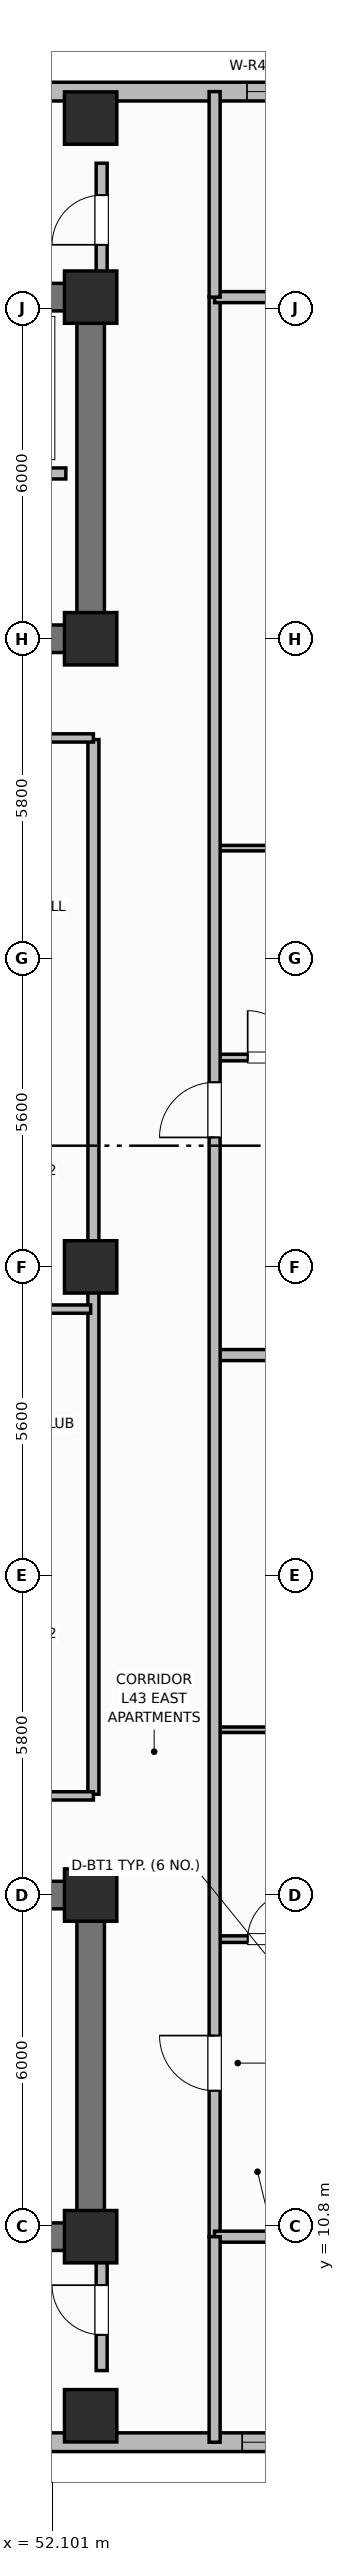
"""IFC4 building model, lengths in metres.
Left out: names, types, materials, properties, quantities, classifications, styles, units other than length and angle.
Written with IfcOpenShell. Run it as: python <this file> out.ifc"""

import sys

from ifc_helpers import new_model, si_unit, direction, frame, frame_2d, origin, origin_2d, place, context, subcontext, project, spatial, rectangle, extrude, element, fill, save


model = new_model("IFC4")
c1 = context("Model", 3, precision=1e-05, world=origin(), true_north=direction((0.0, 1.0)))
c2 = subcontext(c1, "Body", "Model", "MODEL_VIEW")
j1 = project(units=[si_unit("LENGTHUNIT", "METRE"), si_unit("PLANEANGLEUNIT", "RADIAN")], contexts=[c1])
p1 = place(None, origin())
s1 = spatial("IfcSite", under=j1, at=p1, CompositionType="ELEMENT")
p2 = place(p1, origin())
s2 = spatial("IfcBuilding", under=s1, at=p2, CompositionType="ELEMENT")
p3 = place(p2, frame((0.0, 0.0, 173.7)))
s3 = spatial("IfcBuildingStorey", under=s2, at=p3, CompositionType="ELEMENT", Elevation=173.7)
p4 = place(p3, frame((52.8, 10.6, 0.0), z_axis=(0.0, 0.0, 1.0), x_axis=(-1.0, 0.0, 0.0)))
e1 = element("IfcWall", 1, at=p4, inside=s3, PredefinedType="SHEAR", context=c2, shape_type="SweptSolid", body=[
    extrude(rectangle(XDim=27.2, YDim=0.5, at=frame_2d((13.6, 0.0))), origin(), (0.0, 0.0, 1.0), 3.7),
])
p5 = place(p3, frame((52.8, 10.85, 0.0), z_axis=(0.0, 0.0, 1.0), x_axis=(0.0, 1.0, 0.0)))
e2 = element("IfcWall", 2, at=p5, inside=s3, PredefinedType="SHEAR", context=c2, shape_type="SweptSolid", body=[
    extrude(rectangle(XDim=5.7, YDim=0.5, at=frame_2d((2.85, 0.0))), origin(), (0.0, 0.0, 1.0), 3.7),
])
p6 = place(p3, frame((25.6, 16.8, 0.0), z_axis=(0.0, 0.0, 1.0), x_axis=(1.0, 0.0, 0.0)))
e3 = element("IfcWall", 3, at=p6, inside=s3, PredefinedType="SHEAR", context=c2, shape_type="SweptSolid", body=[
    extrude(rectangle(XDim=27.2, YDim=0.5, at=frame_2d((13.6, 0.0))), origin(), (0.0, 0.0, 1.0), 3.7),
])
p7 = place(p6, frame((1.8, 0.0, 0.0)))
e4 = element("IfcOpeningElement", 4, at=p7, cuts=e3, PredefinedType="OPENING", context=c2, shape_type="SweptSolid", body=[
    extrude(rectangle(XDim=1.1, YDim=2.15, at=frame_2d((0.55, 1.075))), frame((0.0, 0.26, 0.0), z_axis=(0.0, -1.0, 0.0), x_axis=(1.0, 0.0, 0.0)), (0.0, 0.0, 1.0), 0.52),
])
p8 = place(p6, frame((5.6, 0.0, 0.0)))
e5 = element("IfcOpeningElement", 5, at=p8, cuts=e3, PredefinedType="OPENING", context=c2, shape_type="SweptSolid", body=[
    extrude(rectangle(XDim=0.85, YDim=2.1, at=frame_2d((0.425, 1.05))), frame((0.0, 0.26, 0.0), z_axis=(0.0, -1.0, 0.0), x_axis=(1.0, 0.0, 0.0)), (0.0, 0.0, 1.0), 0.52),
])
p9 = place(p6, frame((13.0, 0.0, 0.0)))
e6 = element("IfcOpeningElement", 6, at=p9, cuts=e3, PredefinedType="OPENING", context=c2, shape_type="SweptSolid", body=[
    extrude(rectangle(XDim=1.2, YDim=2.15, at=frame_2d((0.6, 1.075))), frame((0.0, 0.26, 0.0), z_axis=(0.0, -1.0, 0.0), x_axis=(1.0, 0.0, 0.0)), (0.0, 0.0, 1.0), 0.52),
])
p10 = place(p6, frame((19.2, 0.0, 0.0)))
e7 = element("IfcOpeningElement", 7, at=p10, cuts=e3, PredefinedType="OPENING", context=c2, shape_type="SweptSolid", body=[
    extrude(rectangle(XDim=0.85, YDim=2.1, at=frame_2d((0.425, 1.05))), frame((0.0, 0.26, 0.0), z_axis=(0.0, -1.0, 0.0), x_axis=(1.0, 0.0, 0.0)), (0.0, 0.0, 1.0), 0.52),
])
p11 = place(p6, frame((23.8, 0.0, 0.0)))
e8 = element("IfcOpeningElement", 8, at=p11, cuts=e3, PredefinedType="OPENING", context=c2, shape_type="SweptSolid", body=[
    extrude(rectangle(XDim=0.9, YDim=2.1, at=frame_2d((0.45, 1.05))), frame((0.0, 0.26, 0.0), z_axis=(0.0, -1.0, 0.0), x_axis=(1.0, 0.0, 0.0)), (0.0, 0.0, 1.0), 0.52),
])
p12 = place(p3, frame((25.6, 45.8, 0.0), z_axis=(0.0, 0.0, 1.0), x_axis=(1.0, 0.0, 0.0)))
e9 = element("IfcWall", 9, at=p12, inside=s3, PredefinedType="SHEAR", context=c2, shape_type="SweptSolid", body=[
    extrude(rectangle(XDim=27.2, YDim=0.5, at=frame_2d((13.6, 0.0))), origin(), (0.0, 0.0, 1.0), 3.7),
])
p13 = place(p3, frame((52.8, 39.85, 0.0), z_axis=(0.0, 0.0, 1.0), x_axis=(0.0, 1.0, 0.0)))
e10 = element("IfcWall", 10, at=p13, inside=s3, PredefinedType="SHEAR", context=c2, shape_type="SweptSolid", body=[
    extrude(rectangle(XDim=5.7, YDim=0.5, at=frame_2d((2.85, 0.0))), origin(), (0.0, 0.0, 1.0), 3.7),
])
p14 = place(p3, frame((52.8, 39.6, 0.0), z_axis=(0.0, 0.0, 1.0), x_axis=(-1.0, 0.0, 0.0)))
e11 = element("IfcWall", 11, at=p14, inside=s3, PredefinedType="SHEAR", context=c2, shape_type="SweptSolid", body=[
    extrude(rectangle(XDim=27.2, YDim=0.5, at=frame_2d((13.6, 0.0))), origin(), (0.0, 0.0, 1.0), 3.7),
])
p15 = place(p14, frame((24.2, 0.0, 0.0)))
e12 = element("IfcOpeningElement", 12, at=p15, cuts=e11, PredefinedType="OPENING", context=c2, shape_type="SweptSolid", body=[
    extrude(rectangle(XDim=1.1, YDim=2.15, at=frame_2d((0.55, 1.075))), frame((0.0, 0.26, 0.0), z_axis=(0.0, -1.0, 0.0), x_axis=(1.0, 0.0, 0.0)), (0.0, 0.0, 1.0), 0.52),
])
p16 = place(p14, frame((20.55, 0.0, 0.0)))
e13 = element("IfcOpeningElement", 13, at=p16, cuts=e11, PredefinedType="OPENING", context=c2, shape_type="SweptSolid", body=[
    extrude(rectangle(XDim=0.95, YDim=2.1, at=frame_2d((0.475, 1.05))), frame((0.0, 0.26, 0.0), z_axis=(0.0, -1.0, 0.0), x_axis=(1.0, 0.0, 0.0)), (0.0, 0.0, 1.0), 0.52),
])
p17 = place(p14, frame((15.1, 0.0, 0.0)))
e14 = element("IfcOpeningElement", 14, at=p17, cuts=e11, PredefinedType="OPENING", context=c2, shape_type="SweptSolid", body=[
    extrude(rectangle(XDim=1.2, YDim=2.15, at=frame_2d((0.6, 1.075))), frame((0.0, 0.26, 0.0), z_axis=(0.0, -1.0, 0.0), x_axis=(1.0, 0.0, 0.0)), (0.0, 0.0, 1.0), 0.52),
])
p18 = place(p14, frame((13.05, 0.0, 0.0)))
e15 = element("IfcOpeningElement", 15, at=p18, cuts=e11, PredefinedType="OPENING", context=c2, shape_type="SweptSolid", body=[
    extrude(rectangle(XDim=0.85, YDim=2.1, at=frame_2d((0.425, 1.05))), frame((0.0, 0.26, 0.0), z_axis=(0.0, -1.0, 0.0), x_axis=(1.0, 0.0, 0.0)), (0.0, 0.0, 1.0), 0.52),
])
p19 = place(p14, frame((11.0, 0.0, 0.0)))
e16 = element("IfcOpeningElement", 16, at=p19, cuts=e11, PredefinedType="OPENING", context=c2, shape_type="SweptSolid", body=[
    extrude(rectangle(XDim=0.85, YDim=2.1, at=frame_2d((0.425, 1.05))), frame((0.0, 0.26, 0.0), z_axis=(0.0, -1.0, 0.0), x_axis=(1.0, 0.0, 0.0)), (0.0, 0.0, 1.0), 0.52),
])
p20 = place(p14, frame((7.35, 0.0, 0.0)))
e17 = element("IfcOpeningElement", 17, at=p20, cuts=e11, PredefinedType="OPENING", context=c2, shape_type="SweptSolid", body=[
    extrude(rectangle(XDim=0.85, YDim=2.1, at=frame_2d((0.425, 1.05))), frame((0.0, 0.26, 0.0), z_axis=(0.0, -1.0, 0.0), x_axis=(1.0, 0.0, 0.0)), (0.0, 0.0, 1.0), 0.52),
])
p21 = place(p14, frame((4.8, 0.0, 0.0)))
e18 = element("IfcOpeningElement", 18, at=p21, cuts=e11, PredefinedType="OPENING", context=c2, shape_type="SweptSolid", body=[
    extrude(rectangle(XDim=0.85, YDim=2.1, at=frame_2d((0.425, 1.05))), frame((0.0, 0.26, 0.0), z_axis=(0.0, -1.0, 0.0), x_axis=(1.0, 0.0, 0.0)), (0.0, 0.0, 1.0), 0.52),
])
p22 = place(p14, frame((1.9, 0.0, 0.0)))
e19 = element("IfcOpeningElement", 19, at=p22, cuts=e11, PredefinedType="OPENING", context=c2, shape_type="SweptSolid", body=[
    extrude(rectangle(XDim=0.85, YDim=2.1, at=frame_2d((0.425, 1.05))), frame((0.0, 0.26, 0.0), z_axis=(0.0, -1.0, 0.0), x_axis=(1.0, 0.0, 0.0)), (0.0, 0.0, 1.0), 0.52),
])
for number, where, z_axis, x_axis in (
    (20, (52.8, 10.6, 0.0), (0.0, 0.0, 1.0), (1.0, 0.0, 0.0)),
    (21, (52.8, 16.8, 0.0), (0.0, 0.0, 1.0), (1.0, 0.0, 0.0)),
    (22, (52.8, 39.6, 0.0), (0.0, 0.0, 1.0), (1.0, 0.0, 0.0)),
    (23, (52.8, 45.8, 0.0), (0.0, 0.0, 1.0), (1.0, 0.0, 0.0)),
    (24, (52.8, 28.2, 0.0), (0.0, 0.0, 1.0), (1.0, 0.0, 0.0)),
    (25, (52.8, 7.35, 0.0), (0.0, 0.0, 1.0), (1.0, 0.0, 0.0)),
    (26, (52.8, 49.05, 0.0), (0.0, 0.0, 1.0), (1.0, 0.0, 0.0)),
):
    element("IfcColumn", number, at=place(p3, frame(where, z_axis=z_axis, x_axis=x_axis)), inside=s3, PredefinedType="COLUMN", context=c2, shape_type="SweptSolid", body=[
        extrude(rectangle(XDim=0.95, YDim=0.95, at=origin_2d()), origin(), (0.0, 0.0, 1.0), 3.7),
    ])
p23 = place(p3, frame((42.4, 6.87, 0.0), z_axis=(0.0, 0.0, 1.0), x_axis=(1.0, 0.0, 0.0)))
e27 = element("IfcWall", 27, at=p23, inside=s3, PredefinedType="SOLIDWALL", context=c2, shape_type="SweptSolid", body=[
    extrude(rectangle(XDim=15.8, YDim=0.34, at=frame_2d((7.9, 0.0))), origin(), (0.0, 0.0, 1.0), 2.72),
])
p24 = place(p23, frame((4.45, 0.0, 0.95)))
e28 = element("IfcOpeningElement", 28, at=p24, cuts=e27, PredefinedType="OPENING", context=c2, shape_type="SweptSolid", body=[
    extrude(rectangle(XDim=1.1, YDim=1.65, at=frame_2d((0.55, 0.825))), frame((0.0, 0.18, 0.0), z_axis=(0.0, -1.0, 0.0), x_axis=(1.0, 0.0, 0.0)), (0.0, 0.0, 1.0), 0.36),
])
p25 = place(p23, frame((7.35, 0.0, 0.95)))
e29 = element("IfcOpeningElement", 29, at=p25, cuts=e27, PredefinedType="OPENING", context=c2, shape_type="SweptSolid", body=[
    extrude(rectangle(XDim=1.1, YDim=1.65, at=frame_2d((0.55, 0.825))), frame((0.0, 0.18, 0.0), z_axis=(0.0, -1.0, 0.0), x_axis=(1.0, 0.0, 0.0)), (0.0, 0.0, 1.0), 0.36),
])
p26 = place(p23, frame((13.15, 0.0, 0.95)))
e30 = element("IfcOpeningElement", 30, at=p26, cuts=e27, PredefinedType="OPENING", context=c2, shape_type="SweptSolid", body=[
    extrude(rectangle(XDim=1.1, YDim=1.65, at=frame_2d((0.55, 0.825))), frame((0.0, 0.18, 0.0), z_axis=(0.0, -1.0, 0.0), x_axis=(1.0, 0.0, 0.0)), (0.0, 0.0, 1.0), 0.36),
])
p27 = place(p3, frame((58.2, 49.53, 0.0), z_axis=(0.0, 0.0, 1.0), x_axis=(-1.0, 0.0, 0.0)))
e31 = element("IfcWall", 31, at=p27, inside=s3, PredefinedType="SOLIDWALL", context=c2, shape_type="SweptSolid", body=[
    extrude(rectangle(XDim=15.8, YDim=0.34, at=frame_2d((7.9, 0.0))), origin(), (0.0, 0.0, 1.0), 2.72),
])
p28 = place(p27, frame((0.962, 0.0, 0.7)))
e32 = element("IfcOpeningElement", 32, at=p28, cuts=e31, PredefinedType="OPENING", context=c2, shape_type="SweptSolid", body=[
    extrude(rectangle(XDim=1.6, YDim=1.9, at=frame_2d((0.8, 0.95))), frame((0.0, 0.18, 0.0), z_axis=(0.0, -1.0, 0.0), x_axis=(1.0, 0.0, 0.0)), (0.0, 0.0, 1.0), 0.36),
])
p29 = place(p27, frame((8.913, 0.0, 0.7)))
e33 = element("IfcOpeningElement", 33, at=p29, cuts=e31, PredefinedType="OPENING", context=c2, shape_type="SweptSolid", body=[
    extrude(rectangle(XDim=1.6, YDim=1.9, at=frame_2d((0.8, 0.95))), frame((0.0, 0.18, 0.0), z_axis=(0.0, -1.0, 0.0), x_axis=(1.0, 0.0, 0.0)), (0.0, 0.0, 1.0), 0.36),
])
p30 = place(p3, frame((52.35, 42.6, 0.0), z_axis=(0.0, 0.0, 1.0), x_axis=(-1.0, 0.0, 0.0)))
e34 = element("IfcWall", 34, at=p30, inside=s3, PredefinedType="PARTITIONING", context=c2, shape_type="SweptSolid", body=[
    extrude(rectangle(XDim=6.5, YDim=0.2, at=frame_2d((3.25, 0.0))), origin(), (0.0, 0.0, 1.0), 2.55),
])
p31 = place(p3, frame((52.85, 18.63, 0.0), z_axis=(0.0, 0.0, 1.0), x_axis=(0.0, 1.0, 0.0)))
e35 = element("IfcWall", 35, at=p31, inside=s3, PredefinedType="PARTITIONING", context=c2, shape_type="SweptSolid", body=[
    extrude(rectangle(XDim=19.14, YDim=0.2, at=frame_2d((9.57, 0.0))), origin(), (0.0, 0.0, 1.0), 2.55),
])
for number, where, z_axis, x_axis in (
    (36, (50.05, 18.6, 0.0), (0.0, 0.0, 1.0), (1.0, 0.0, 0.0)),
    (37, (50.05, 37.8, 0.0), (0.0, 0.0, 1.0), (1.0, 0.0, 0.0)),
):
    element("IfcWall", number, at=place(p3, frame(where, z_axis=z_axis, x_axis=x_axis)), inside=s3, PredefinedType="PARTITIONING", context=c2, shape_type="SweptSolid", body=[
        extrude(rectangle(XDim=2.8, YDim=0.15, at=frame_2d((1.4, 0.0))), origin(), (0.0, 0.0, 1.0), 2.55),
    ])
p32 = place(p3, frame((50.08, 27.434, 0.0), z_axis=(0.0, 0.0, 1.0), x_axis=(1.0, 0.0, 0.0)))
e38 = element("IfcWall", 38, at=p32, inside=s3, PredefinedType="PARTITIONING", context=c2, shape_type="SweptSolid", body=[
    extrude(rectangle(XDim=2.72, YDim=0.15, at=frame_2d((1.36, 0.0))), origin(), (0.0, 0.0, 1.0), 2.55),
])
p33 = place(p3, frame((55.05, 16.0, 0.0), z_axis=(0.0, 0.0, 1.0), x_axis=(1.0, 0.0, 0.0)))
e39 = element("IfcWall", 39, at=p33, inside=s3, PredefinedType="PARTITIONING", context=c2, shape_type="SweptSolid", body=[
    extrude(rectangle(XDim=2.25, YDim=0.12, at=frame_2d((1.125, 0.0))), origin(), (0.0, 0.0, 1.0), 2.55),
])
p34 = place(p33, frame((0.6, 0.0, 0.0)))
e40 = element("IfcOpeningElement", 40, at=p34, cuts=e39, PredefinedType="OPENING", context=c2, shape_type="SweptSolid", body=[
    extrude(rectangle(XDim=0.85, YDim=2.1, at=frame_2d((0.425, 1.05))), frame((0.0, 0.07, 0.0), z_axis=(0.0, -1.0, 0.0), x_axis=(1.0, 0.0, 0.0)), (0.0, 0.0, 1.0), 0.14),
])
p35 = place(p3, frame((55.05, 19.8, 0.0), z_axis=(0.0, 0.0, 1.0), x_axis=(1.0, 0.0, 0.0)))
e41 = element("IfcWall", 41, at=p35, inside=s3, PredefinedType="PARTITIONING", context=c2, shape_type="SweptSolid", body=[
    extrude(rectangle(XDim=2.25, YDim=0.1, at=frame_2d((1.125, 0.0))), origin(), (0.0, 0.0, 1.0), 2.55),
])
p36 = place(p3, frame((55.05, 26.6, 0.0), z_axis=(0.0, 0.0, 1.0), x_axis=(1.0, 0.0, 0.0)))
e42 = element("IfcWall", 42, at=p36, inside=s3, PredefinedType="PARTITIONING", context=c2, shape_type="SweptSolid", body=[
    extrude(rectangle(XDim=6.066, YDim=0.2, at=frame_2d((3.033, 0.0))), origin(), (0.0, 0.0, 1.0), 2.55),
])
p37 = place(p3, frame((55.05, 32.0, 0.0), z_axis=(0.0, 0.0, 1.0), x_axis=(1.0, 0.0, 0.0)))
e43 = element("IfcWall", 43, at=p37, inside=s3, PredefinedType="PARTITIONING", context=c2, shape_type="SweptSolid", body=[
    extrude(rectangle(XDim=2.25, YDim=0.12, at=frame_2d((1.125, 0.0))), origin(), (0.0, 0.0, 1.0), 2.55),
])
p38 = place(p37, frame((0.6, 0.0, 0.0)))
e44 = element("IfcOpeningElement", 44, at=p38, cuts=e43, PredefinedType="OPENING", context=c2, shape_type="SweptSolid", body=[
    extrude(rectangle(XDim=0.85, YDim=2.1, at=frame_2d((0.425, 1.05))), frame((0.0, 0.07, 0.0), z_axis=(0.0, -1.0, 0.0), x_axis=(1.0, 0.0, 0.0)), (0.0, 0.0, 1.0), 0.14),
])
p39 = place(p3, frame((55.05, 35.8, 0.0), z_axis=(0.0, 0.0, 1.0), x_axis=(1.0, 0.0, 0.0)))
e45 = element("IfcWall", 45, at=p39, inside=s3, PredefinedType="PARTITIONING", context=c2, shape_type="SweptSolid", body=[
    extrude(rectangle(XDim=2.25, YDim=0.1, at=frame_2d((1.125, 0.0))), origin(), (0.0, 0.0, 1.0), 2.55),
])
p40 = place(p3, frame((55.05, 10.6, 0.0), z_axis=(0.0, 0.0, 1.0), x_axis=(0.0, 1.0, 0.0)))
e46 = element("IfcWall", 46, at=p40, inside=s3, PredefinedType="PARTITIONING", context=c2, shape_type="SweptSolid", body=[
    extrude(rectangle(XDim=35.2, YDim=0.2, at=frame_2d((17.6, 0.0))), origin(), (0.0, 0.0, 1.0), 2.55),
])
p41 = place(p40, frame((2.65, 0.0, 0.0)))
e47 = element("IfcOpeningElement", 47, at=p41, cuts=e46, PredefinedType="OPENING", context=c2, shape_type="SweptSolid", body=[
    extrude(rectangle(XDim=1.0, YDim=2.15, at=frame_2d((0.5, 1.075))), frame((0.0, 0.11, 0.0), z_axis=(0.0, -1.0, 0.0), x_axis=(1.0, 0.0, 0.0)), (0.0, 0.0, 1.0), 0.22),
])
p42 = place(p40, frame((19.95, 0.0, 0.0)))
e48 = element("IfcOpeningElement", 48, at=p42, cuts=e46, PredefinedType="OPENING", context=c2, shape_type="SweptSolid", body=[
    extrude(rectangle(XDim=1.0, YDim=2.15, at=frame_2d((0.5, 1.075))), frame((0.0, 0.11, 0.0), z_axis=(0.0, -1.0, 0.0), x_axis=(1.0, 0.0, 0.0)), (0.0, 0.0, 1.0), 0.22),
])
for number, where, z_axis, x_axis in (
    (49, (55.05, 10.6, 0.0), (0.0, 0.0, 1.0), (1.0, 0.0, 0.0)),
    (50, (55.05, 45.8, 0.0), (0.0, 0.0, 1.0), (1.0, 0.0, 0.0)),
):
    element("IfcWall", number, at=place(p3, frame(where, z_axis=z_axis, x_axis=x_axis)), inside=s3, PredefinedType="PARTITIONING", context=c2, shape_type="SweptSolid", body=[
        extrude(rectangle(XDim=6.36, YDim=0.2, at=frame_2d((3.18, 0.0))), origin(), (0.0, 0.0, 1.0), 2.55),
    ])
for number, where, z_axis, x_axis in (
    (51, (55.05, 6.87, 0.0), (0.0, 0.0, 1.0), (0.0, 1.0, 0.0)),
    (52, (55.05, 45.8, 0.0), (0.0, 0.0, 1.0), (0.0, 1.0, 0.0)),
):
    element("IfcWall", number, at=place(p3, frame(where, z_axis=z_axis, x_axis=x_axis)), inside=s3, PredefinedType="PARTITIONING", context=c2, shape_type="SweptSolid", body=[
        extrude(rectangle(XDim=3.73, YDim=0.2, at=frame_2d((1.865, 0.0))), origin(), (0.0, 0.0, 1.0), 2.55),
    ])
p43 = place(p3, frame((53.0, 8.17, 0.0), z_axis=(0.0, 0.0, 1.0), x_axis=(0.0, 1.0, 0.0)))
e53 = element("IfcWall", 53, at=p43, inside=s3, PredefinedType="PARTITIONING", context=c2, shape_type="SweptSolid", body=[
    extrude(rectangle(XDim=2.13, YDim=0.2, at=frame_2d((1.065, 0.0))), origin(), (0.0, 0.0, 1.0), 2.55),
])
p44 = place(p43, frame((0.65, 0.0, 0.0)))
e54 = element("IfcOpeningElement", 54, at=p44, cuts=e53, PredefinedType="OPENING", context=c2, shape_type="SweptSolid", body=[
    extrude(rectangle(XDim=0.9, YDim=2.1, at=frame_2d((0.45, 1.05))), frame((0.0, 0.11, 0.0), z_axis=(0.0, -1.0, 0.0), x_axis=(1.0, 0.0, 0.0)), (0.0, 0.0, 1.0), 0.22),
])
p45 = place(p3, frame((53.0, 46.1, 0.0), z_axis=(0.0, 0.0, 1.0), x_axis=(0.0, 1.0, 0.0)))
e55 = element("IfcWall", 55, at=p45, inside=s3, PredefinedType="PARTITIONING", context=c2, shape_type="SweptSolid", body=[
    extrude(rectangle(XDim=2.13, YDim=0.2, at=frame_2d((1.065, 0.0))), origin(), (0.0, 0.0, 1.0), 2.55),
])
p46 = place(p45, frame((0.65, 0.0, 0.0)))
e56 = element("IfcOpeningElement", 56, at=p46, cuts=e55, PredefinedType="OPENING", context=c2, shape_type="SweptSolid", body=[
    extrude(rectangle(XDim=0.9, YDim=2.1, at=frame_2d((0.45, 1.05))), frame((0.0, 0.11, 0.0), z_axis=(0.0, -1.0, 0.0), x_axis=(1.0, 0.0, 0.0)), (0.0, 0.0, 1.0), 0.22),
])
p47 = place(p26, origin())
e57 = element("IfcWindow", 57, at=p47, inside=s3, PartitioningType="SINGLE_PANEL", PredefinedType="WINDOW", context=c2, shape_type="SweptSolid", body=[
    extrude(rectangle(XDim=1.1, YDim=1.65, at=frame_2d((0.55, 0.825))), frame((0.0, 0.03, 0.0), z_axis=(0.0, -1.0, 0.0), x_axis=(1.0, 0.0, 0.0)), (0.0, 0.0, 1.0), 0.06),
])
fill(e30, e57)
p48 = place(p28, origin())
e58 = element("IfcWindow", 58, at=p48, inside=s3, PartitioningType="SINGLE_PANEL", PredefinedType="WINDOW", context=c2, shape_type="SweptSolid", body=[
    extrude(rectangle(XDim=1.6, YDim=1.9, at=frame_2d((0.8, 0.95))), frame((0.0, 0.03, 0.0), z_axis=(0.0, -1.0, 0.0), x_axis=(1.0, 0.0, 0.0)), (0.0, 0.0, 1.0), 0.06),
])
fill(e32, e58)
p49 = place(p34, origin())
e59 = element("IfcDoor", 59, at=p49, inside=s3, OperationType="SINGLE_SWING_RIGHT", PredefinedType="DOOR", context=c2, shape_type="SweptSolid", body=[
    extrude(rectangle(XDim=0.85, YDim=2.1, at=frame_2d((0.425, 1.05))), frame((0.0, 0.025, 0.0), z_axis=(0.0, -1.0, 0.0), x_axis=(1.0, 0.0, 0.0)), (0.0, 0.0, 1.0), 0.05),
])
fill(e40, e59)
p50 = place(p38, origin())
e60 = element("IfcDoor", 60, at=p50, inside=s3, OperationType="SINGLE_SWING_LEFT", PredefinedType="DOOR", context=c2, shape_type="SweptSolid", body=[
    extrude(rectangle(XDim=0.85, YDim=2.1, at=frame_2d((0.425, 1.05))), frame((0.0, 0.025, 0.0), z_axis=(0.0, -1.0, 0.0), x_axis=(1.0, 0.0, 0.0)), (0.0, 0.0, 1.0), 0.05),
])
fill(e44, e60)
p51 = place(p41, origin())
e61 = element("IfcDoor", 61, at=p51, inside=s3, OperationType="SINGLE_SWING_RIGHT", PredefinedType="DOOR", context=c2, shape_type="SweptSolid", body=[
    extrude(rectangle(XDim=1.0, YDim=2.15, at=frame_2d((0.5, 1.075))), frame((0.0, 0.025, 0.0), z_axis=(0.0, -1.0, 0.0), x_axis=(1.0, 0.0, 0.0)), (0.0, 0.0, 1.0), 0.05),
])
fill(e47, e61)
p52 = place(p42, origin())
e62 = element("IfcDoor", 62, at=p52, inside=s3, OperationType="SINGLE_SWING_LEFT", PredefinedType="DOOR", context=c2, shape_type="SweptSolid", body=[
    extrude(rectangle(XDim=1.0, YDim=2.15, at=frame_2d((0.5, 1.075))), frame((0.0, 0.025, 0.0), z_axis=(0.0, -1.0, 0.0), x_axis=(1.0, 0.0, 0.0)), (0.0, 0.0, 1.0), 0.05),
])
fill(e48, e62)
p53 = place(p44, origin())
e63 = element("IfcDoor", 63, at=p53, inside=s3, OperationType="SINGLE_SWING_RIGHT", PredefinedType="DOOR", context=c2, shape_type="SweptSolid", body=[
    extrude(rectangle(XDim=0.9, YDim=2.1, at=frame_2d((0.45, 1.05))), frame((0.0, 0.025, 0.0), z_axis=(0.0, -1.0, 0.0), x_axis=(1.0, 0.0, 0.0)), (0.0, 0.0, 1.0), 0.05),
])
fill(e54, e63)
p54 = place(p46, origin())
e64 = element("IfcDoor", 64, at=p54, inside=s3, OperationType="SINGLE_SWING_LEFT", PredefinedType="DOOR", context=c2, shape_type="SweptSolid", body=[
    extrude(rectangle(XDim=0.9, YDim=2.1, at=frame_2d((0.45, 1.05))), frame((0.0, 0.025, 0.0), z_axis=(0.0, -1.0, 0.0), x_axis=(1.0, 0.0, 0.0)), (0.0, 0.0, 1.0), 0.05),
])
fill(e56, e64)
save(model, sys.argv[1])
